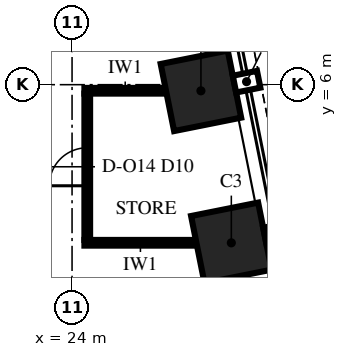
"""IFC4 building model, lengths in metres.
Left out: names, types, materials, properties, quantities, classifications, styles, units other than length and angle.
Written with IfcOpenShell. Run it as: python <this file> out.ifc"""

import sys

from ifc_helpers import new_model, si_unit, direction, frame, frame_2d, origin, origin_2d, place, context, subcontext, project, spatial, rectangle, extrude, element, fill, save


model = new_model("IFC4")
c1 = context("Model", 3, precision=1e-05, world=origin(), true_north=direction((0.0, 1.0)))
c2 = subcontext(c1, "Body", "Model", "MODEL_VIEW")
j1 = project(units=[si_unit("LENGTHUNIT", "METRE"), si_unit("PLANEANGLEUNIT", "RADIAN")], contexts=[c1])
p1 = place(None, origin())
s1 = spatial("IfcSite", under=j1, at=p1, CompositionType="ELEMENT")
p2 = place(p1, origin())
s2 = spatial("IfcBuilding", under=s1, at=p2, CompositionType="ELEMENT")
p3 = place(p2, frame((0.0, 0.0, 98.0)))
s3 = spatial("IfcBuildingStorey", under=s2, at=p3, CompositionType="ELEMENT", Elevation=98.0)
for number, where, z_axis, x_axis in (
    (1, (28.191, 1.838, 0.0), (0.0, 0.0, 1.0), (-0.196, 0.981, 0.0)),
    (2, (27.391, 5.838, 0.0), (0.0, 0.0, 1.0), (-0.196, 0.981, 0.0)),
):
    element("IfcColumn", number, at=place(p3, frame(where, z_axis=z_axis, x_axis=x_axis)), inside=s3, PredefinedType="COLUMN", context=c2, shape_type="SweptSolid", body=[
        extrude(rectangle(XDim=1.8, YDim=1.8, at=origin_2d()), origin(), (0.0, 0.0, 1.0), 5.0),
    ])
p4 = place(p3, frame((24.325, 1.84, 0.0), z_axis=(0.0, 0.0, 1.0), x_axis=(1.0, 0.0, 0.0)))
e3 = element("IfcWall", 3, at=p4, inside=s3, PredefinedType="PARTITIONING", context=c2, shape_type="SweptSolid", body=[
    extrude(rectangle(XDim=2.948, YDim=0.15, at=frame_2d((1.474, 0.0))), origin(), (0.0, 0.0, 1.0), 4.25),
])
p5 = place(p3, frame((24.325, 5.84, 0.0), z_axis=(0.0, 0.0, 1.0), x_axis=(1.0, 0.0, 0.0)))
e4 = element("IfcWall", 4, at=p5, inside=s3, PredefinedType="PARTITIONING", context=c2, shape_type="SweptSolid", body=[
    extrude(rectangle(XDim=2.148, YDim=0.15, at=frame_2d((1.074, 0.0))), origin(), (0.0, 0.0, 1.0), 3.842),
])
p6 = place(p3, frame((24.4, 1.915, 0.0), z_axis=(0.0, 0.0, 1.0), x_axis=(0.0, 1.0, 0.0)))
e5 = element("IfcWall", 5, at=p6, inside=s3, PredefinedType="PARTITIONING", context=c2, shape_type="SweptSolid", body=[
    extrude(rectangle(XDim=3.85, YDim=0.15, at=frame_2d((1.925, 0.0))), origin(), (0.0, 0.0, 1.0), 4.85),
])
p7 = place(p6, frame((1.425, 0.0, 0.0)))
e6 = element("IfcOpeningElement", 6, at=p7, cuts=e5, PredefinedType="OPENING", context=c2, shape_type="SweptSolid", body=[
    extrude(rectangle(XDim=1.0, YDim=2.3, at=frame_2d((0.5, 1.15))), frame((0.0, 0.09, 0.0), z_axis=(0.0, -1.0, 0.0), x_axis=(1.0, 0.0, 0.0)), (0.0, 0.0, 1.0), 0.18),
])
p8 = place(p7, origin())
e7 = element("IfcDoor", 7, at=p8, inside=s3, OperationType="SINGLE_SWING_LEFT", PredefinedType="DOOR", context=c2, shape_type="SweptSolid", body=[
    extrude(rectangle(XDim=1.0, YDim=2.3, at=frame_2d((0.5, 1.15))), frame((0.0, 0.075, 0.0), z_axis=(0.0, -1.0, 0.0), x_axis=(1.0, 0.0, 0.0)), (0.0, 0.0, 1.0), 0.149),
])
fill(e6, e7)
save(model, sys.argv[1])
